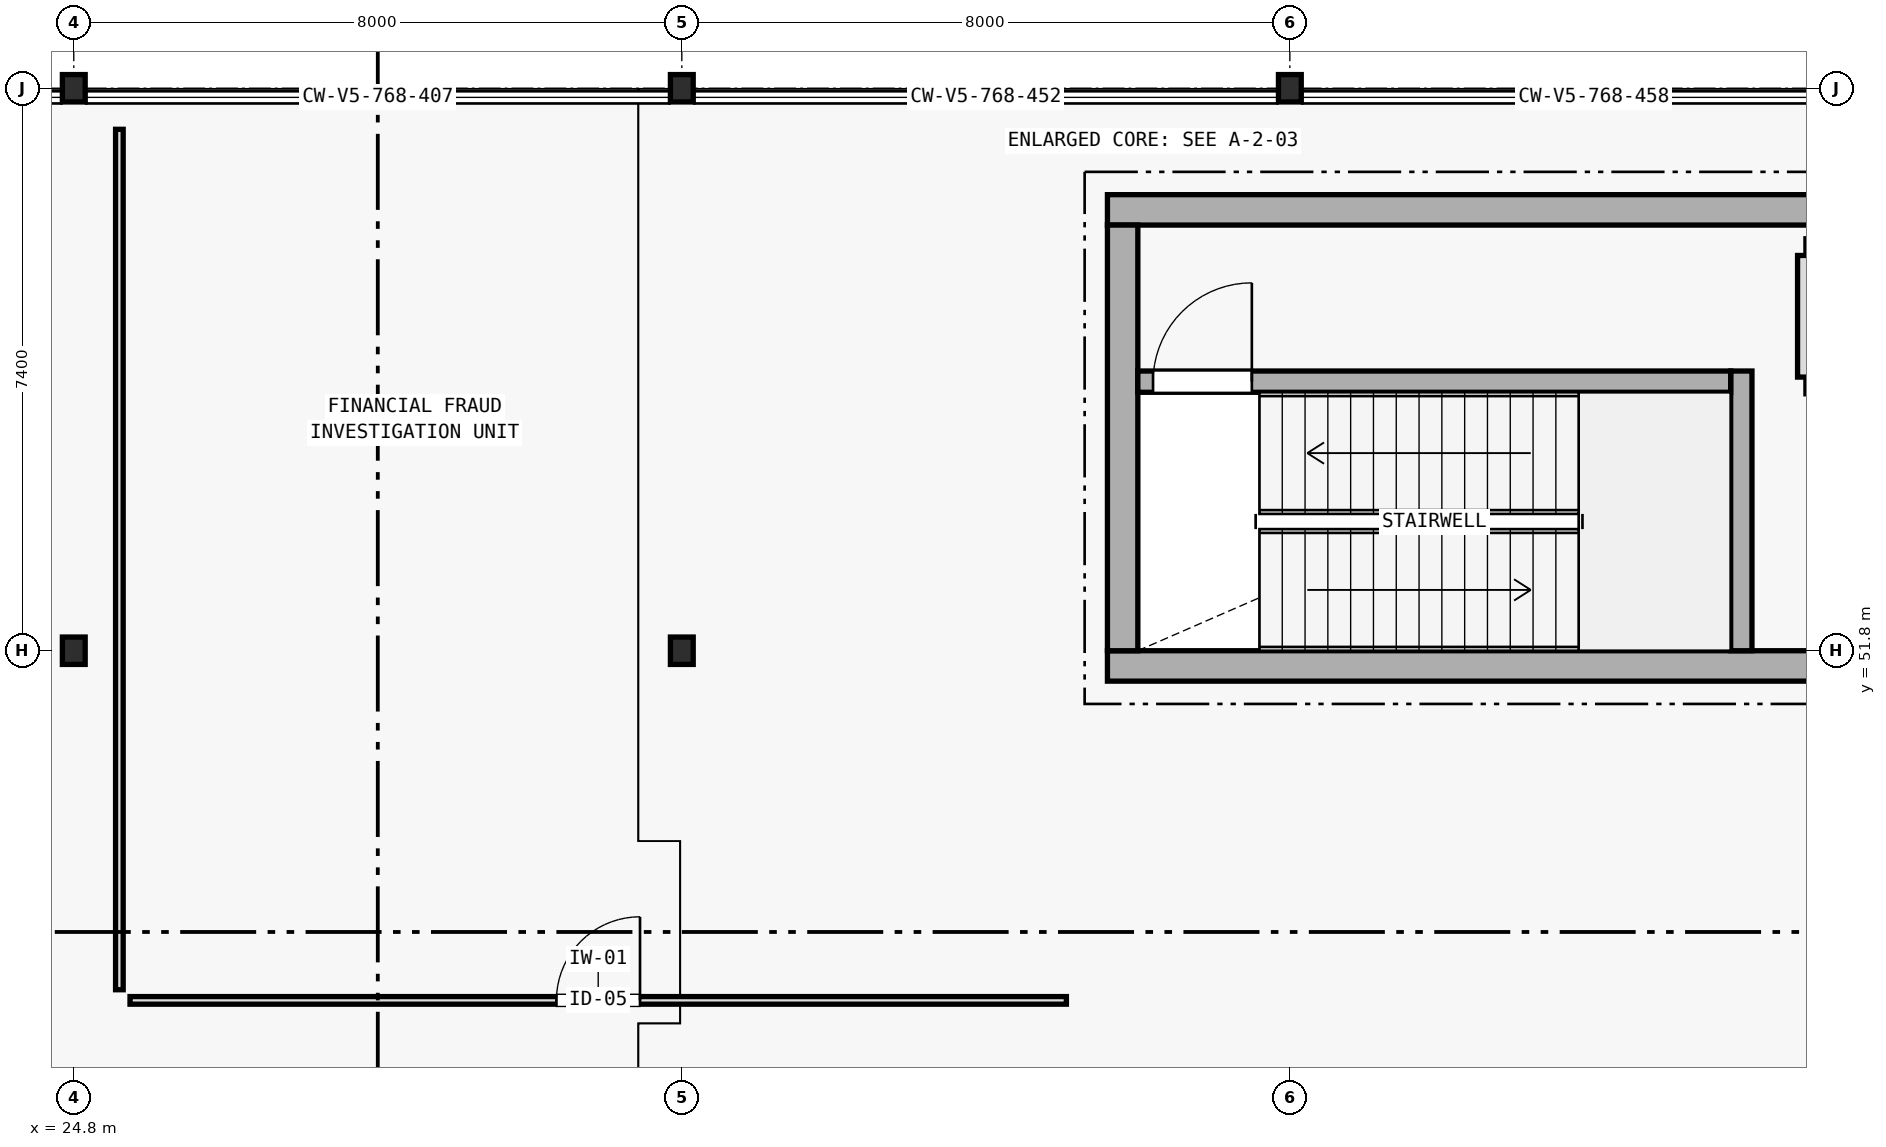
"""IFC4 building model, lengths in metres.
Left out: names, types, materials, properties, quantities, classifications, styles, units other than length and angle.
Written with IfcOpenShell. Run it as: python <this file> out.ifc"""

import sys

from ifc_helpers import new_model, si_unit, direction, frame, frame_2d, origin, origin_2d, place, context, subcontext, project, spatial, rectangle, i_section, extrude, element, fill, save


model = new_model("IFC4")
c1 = context("Model", 3, precision=1e-05, world=origin(), true_north=direction((0.0, 1.0)))
c2 = subcontext(c1, "Body", "Model", "MODEL_VIEW")
j1 = project(units=[si_unit("LENGTHUNIT", "METRE"), si_unit("PLANEANGLEUNIT", "RADIAN")], contexts=[c1])
p1 = place(None, origin())
s1 = spatial("IfcSite", under=j1, at=p1, CompositionType="ELEMENT")
p2 = place(p1, origin())
s2 = spatial("IfcBuilding", under=s1, at=p2, CompositionType="ELEMENT")
p3 = place(p2, frame((0.0, 0.0, 18.1)))
s3 = spatial("IfcBuildingStorey", under=s2, at=p3, CompositionType="ELEMENT", Elevation=18.1)
p4 = place(p3, frame((38.4, 51.6, 0.0), z_axis=(0.0, 0.0, 1.0), x_axis=(1.0, 0.0, 0.0)))
e1 = element("IfcWall", 1, at=p4, inside=s3, PredefinedType="SHEAR", context=c2, shape_type="SweptSolid", body=[
    extrude(rectangle(XDim=15.2, YDim=0.4, at=frame_2d((7.6, 0.0))), origin(), (0.0, 0.0, 1.0), 5.195),
])
p5 = place(p4, frame((10.25, 0.0, 0.0)))
e2 = element("IfcOpeningElement", 2, at=p5, cuts=e1, PredefinedType="OPENING", context=c2, shape_type="SweptSolid", body=[
    extrude(rectangle(XDim=1.3, YDim=2.2, at=frame_2d((0.65, 1.1))), frame((0.0, 0.21, 0.0), z_axis=(0.0, -1.0, 0.0), x_axis=(1.0, 0.0, 0.0)), (0.0, 0.0, 1.0), 0.42),
])
p6 = place(p3, frame((38.4, 57.6, 0.0), z_axis=(0.0, 0.0, 1.0), x_axis=(1.0, 0.0, 0.0)))
e3 = element("IfcWall", 3, at=p6, inside=s3, PredefinedType="SHEAR", context=c2, shape_type="SweptSolid", body=[
    extrude(rectangle(XDim=15.2, YDim=0.4, at=frame_2d((7.6, 0.0))), origin(), (0.0, 0.0, 1.0), 5.195),
])
p7 = place(p3, frame((38.6, 51.8, 0.0), z_axis=(0.0, 0.0, 1.0), x_axis=(0.0, 1.0, 0.0)))
e4 = element("IfcWall", 4, at=p7, inside=s3, PredefinedType="SHEAR", context=c2, shape_type="SweptSolid", body=[
    extrude(rectangle(XDim=5.6, YDim=0.4, at=frame_2d((2.8, 0.0))), origin(), (0.0, 0.0, 1.0), 5.195),
])
p8 = place(p3, frame((46.74, 51.8, 0.0), z_axis=(0.0, 0.0, 1.0), x_axis=(0.0, 1.0, 0.0)))
e5 = element("IfcWall", 5, at=p8, inside=s3, PredefinedType="SHEAR", context=c2, shape_type="SweptSolid", body=[
    extrude(rectangle(XDim=3.68, YDim=0.28, at=frame_2d((1.84, 0.0))), origin(), (0.0, 0.0, 1.0), 5.195),
])
p9 = place(p3, frame((38.8, 55.34, 0.0), z_axis=(0.0, 0.0, 1.0), x_axis=(1.0, 0.0, 0.0)))
e6 = element("IfcWall", 6, at=p9, inside=s3, PredefinedType="SHEAR", context=c2, shape_type="SweptSolid", body=[
    extrude(rectangle(XDim=7.8, YDim=0.28, at=frame_2d((3.9, 0.0))), origin(), (0.0, 0.0, 1.0), 5.195),
])
p10 = place(p9, frame((0.2, 0.0, 0.0)))
e7 = element("IfcOpeningElement", 7, at=p10, cuts=e6, PredefinedType="OPENING", context=c2, shape_type="SweptSolid", body=[
    extrude(rectangle(XDim=1.3, YDim=2.2, at=frame_2d((0.65, 1.1))), frame((0.0, 0.15, 0.0), z_axis=(0.0, -1.0, 0.0), x_axis=(1.0, 0.0, 0.0)), (0.0, 0.0, 1.0), 0.3),
])
for number, where, z_axis, x_axis in (
    (8, (24.8, 51.8, 0.0), (0.0, 0.0, 1.0), (1.0, 0.0, 0.0)),
    (9, (24.8, 59.2, 0.0), (0.0, 0.0, 1.0), (1.0, 0.0, 0.0)),
    (10, (32.8, 51.8, 0.0), (0.0, 0.0, 1.0), (1.0, 0.0, 0.0)),
    (11, (32.8, 59.2, 0.0), (0.0, 0.0, 1.0), (1.0, 0.0, 0.0)),
    (12, (40.8, 59.2, 0.0), (0.0, 0.0, 1.0), (1.0, 0.0, 0.0)),
):
    element("IfcColumn", number, at=place(p3, frame(where, z_axis=z_axis, x_axis=x_axis)), inside=s3, PredefinedType="COLUMN", context=c2, shape_type="SweptSolid", body=[
        extrude(i_section(OverallWidth=0.3, OverallDepth=0.36, WebThickness=0.012, FlangeThickness=0.022, FilletRadius=0.027, at=origin_2d()), origin(), (0.0, 0.0, 1.0), 5.2),
    ])
p11 = place(p3, frame((47.59, 55.29, 0.0), z_axis=(0.0, 0.0, 1.0), x_axis=(1.0, 0.0, 0.0)))
e13 = element("IfcWall", 13, at=p11, inside=s3, PredefinedType="PLUMBINGWALL", context=c2, shape_type="SweptSolid", body=[
    extrude(rectangle(XDim=1.62, YDim=0.22, at=frame_2d((0.81, 0.0))), origin(), (0.0, 0.0, 1.0), 4.98),
])
p12 = place(p11, frame((0.31, 0.0, 0.0)))
e14 = element("IfcOpeningElement", 14, at=p12, cuts=e13, PredefinedType="OPENING", context=c2, shape_type="SweptSolid", body=[
    extrude(rectangle(XDim=1.0, YDim=2.2, at=frame_2d((0.5, 1.1))), frame((0.0, 0.12, 0.0), z_axis=(0.0, -1.0, 0.0), x_axis=(1.0, 0.0, 0.0)), (0.0, 0.0, 1.0), 0.24),
])
p13 = place(p3, frame((47.59, 57.11, 0.0), z_axis=(0.0, 0.0, 1.0), x_axis=(1.0, 0.0, 0.0)))
e15 = element("IfcWall", 15, at=p13, inside=s3, PredefinedType="PLUMBINGWALL", context=c2, shape_type="SweptSolid", body=[
    extrude(rectangle(XDim=1.62, YDim=0.22, at=frame_2d((0.81, 0.0))), origin(), (0.0, 0.0, 1.0), 4.98),
])
p14 = place(p3, frame((47.59, 55.4, 0.0), z_axis=(0.0, 0.0, 1.0), x_axis=(0.0, 1.0, 0.0)))
e16 = element("IfcWall", 16, at=p14, inside=s3, PredefinedType="PLUMBINGWALL", context=c2, shape_type="SweptSolid", body=[
    extrude(rectangle(XDim=1.6, YDim=0.22, at=frame_2d((0.8, 0.0))), origin(), (0.0, 0.0, 1.0), 4.98),
])
p15 = place(p3, frame((25.54, 47.2, 0.0), z_axis=(0.0, 0.0, 1.0), x_axis=(1.0, 0.0, 0.0)))
e17 = element("IfcWall", 17, at=p15, inside=s3, PredefinedType="PARTITIONING", context=c2, shape_type="SweptSolid", body=[
    extrude(rectangle(XDim=12.32, YDim=0.1, at=frame_2d((6.16, 0.0))), origin(), (0.0, 0.0, 1.0), 4.51),
])
p16 = place(p15, frame((5.61, 0.0, 0.0)))
e18 = element("IfcOpeningElement", 18, at=p16, cuts=e17, PredefinedType="OPENING", context=c2, shape_type="SweptSolid", body=[
    extrude(rectangle(XDim=1.1, YDim=2.2, at=frame_2d((0.55, 1.1))), frame((0.0, 0.06, 0.0), z_axis=(0.0, -1.0, 0.0), x_axis=(1.0, 0.0, 0.0)), (0.0, 0.0, 1.0), 0.12),
])
p17 = place(p3, frame((25.4, 47.34, 0.0), z_axis=(0.0, 0.0, 1.0), x_axis=(0.0, 1.0, 0.0)))
e19 = element("IfcWall", 19, at=p17, inside=s3, PredefinedType="PARTITIONING", context=c2, shape_type="SweptSolid", body=[
    extrude(rectangle(XDim=11.32, YDim=0.1, at=frame_2d((5.66, 0.0))), origin(), (0.0, 0.0, 1.0), 4.51),
])
p18 = place(p10, origin())
e20 = element("IfcDoor", 20, at=p18, inside=s3, OperationType="SINGLE_SWING_RIGHT", PredefinedType="DOOR", context=c2, shape_type="SweptSolid", body=[
    extrude(rectangle(XDim=1.3, YDim=2.2, at=frame_2d((0.65, 1.1))), frame((0.0, 0.025, 0.0), z_axis=(0.0, -1.0, 0.0), x_axis=(1.0, 0.0, 0.0)), (0.0, 0.0, 1.0), 0.05),
])
fill(e7, e20)
p19 = place(p16, origin())
e21 = element("IfcDoor", 21, at=p19, inside=s3, OperationType="SINGLE_SWING_RIGHT", PredefinedType="DOOR", context=c2, shape_type="SweptSolid", body=[
    extrude(rectangle(XDim=1.1, YDim=2.2, at=frame_2d((0.55, 1.1))), frame((0.0, 0.025, 0.0), z_axis=(0.0, -1.0, 0.0), x_axis=(1.0, 0.0, 0.0)), (0.0, 0.0, 1.0), 0.05),
])
fill(e18, e21)
save(model, sys.argv[1])
